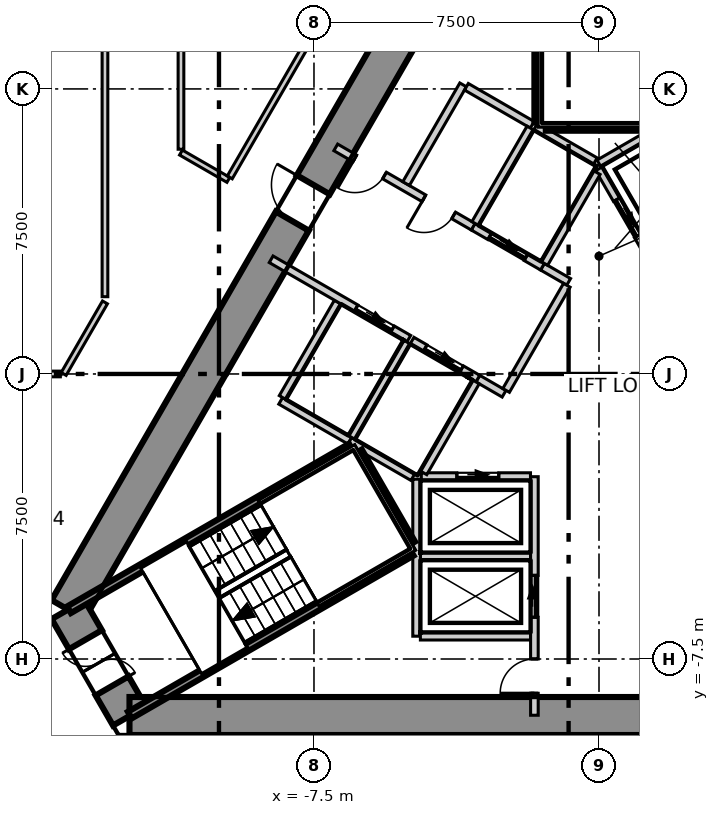
"""IFC4 building model, lengths in metres.
Left out: names, types, materials, properties, quantities, classifications, styles, units other than length and angle.
Written with IfcOpenShell. Run it as: python <this file> out.ifc"""

import sys

from ifc_helpers import new_model, si_unit, direction, frame, frame_2d, origin, place, context, subcontext, project, spatial, polyline, rectangle, outline, extrude, element, fill, save


model = new_model("IFC4")
c1 = context("Model", 3, precision=1e-05, world=origin(), true_north=direction((0.0, 1.0)))
c2 = subcontext(c1, "Body", "Model", "MODEL_VIEW")
j1 = project(units=[si_unit("LENGTHUNIT", "METRE"), si_unit("PLANEANGLEUNIT", "RADIAN")], contexts=[c1])
p1 = place(None, origin())
s1 = spatial("IfcSite", under=j1, at=p1, CompositionType="ELEMENT")
p2 = place(p1, origin())
s2 = spatial("IfcBuilding", under=s1, at=p2, CompositionType="ELEMENT")
p3 = place(p2, frame((0.0, 0.0, 25.3)))
s3 = spatial("IfcBuildingStorey", under=s2, at=p3, CompositionType="ELEMENT", Elevation=25.3)
p4 = place(p3, frame((-1.617, 15.2, -0.4), z_axis=(0.0, 0.0, 1.0), x_axis=(-0.499992141631, -0.866029940768, 0.0)))
e1 = element("IfcWall", 1, at=p4, inside=s3, PredefinedType="SHEAR", context=c2, shape_type="SweptSolid", body=[
    extrude(outline(polyline([(-0.289, -0.499), (1.656, -0.499), (3.601, -0.499), (5.547, -0.499), (7.492, -0.499), (9.437, -0.5), (11.382, -0.5), (13.328, -0.5), (15.273, -0.5), (17.218, -0.5), (19.163, -0.5), (21.109, -0.5), (23.054, -0.5), (24.999, -0.5), (24.422, 0.5), (22.566, 0.5), (20.709, 0.5), (18.853, 0.5), (16.997, 0.5), (15.14, 0.5), (13.284, 0.5), (11.427, 0.5), (9.571, 0.5), (7.715, 0.5), (5.858, 0.5), (4.002, 0.5), (2.146, 0.5), (0.289, 0.5), (-0.289, -0.499)])), origin(), (0.0, 0.0, 1.0), 5.0),
])
p5 = place(p4, frame((11.805, 0.0, 0.4)))
e2 = element("IfcOpeningElement", 2, at=p5, cuts=e1, PredefinedType="OPENING", context=c2, shape_type="SweptSolid", body=[
    extrude(rectangle(XDim=1.1, YDim=2.1, at=frame_2d((0.55, 1.05))), frame((0.0, 0.51, 0.0), z_axis=(0.0, -1.0, 0.0), x_axis=(1.0, 0.0, 0.0)), (0.0, 0.0, 1.0), 1.02),
])
p6 = place(p3, frame((-13.972, -6.2, -0.4), z_axis=(0.0, 0.0, 1.0), x_axis=(0.500077567175, -0.865980615723, 0.0)))
e3 = element("IfcWall", 3, at=p6, inside=s3, PredefinedType="SHEAR", context=c2, shape_type="SweptSolid", body=[
    extrude(outline(polyline([(-0.289, -0.5), (1.616, -0.5), (3.522, -0.5), (2.944, 0.499), (1.617, 0.5), (0.289, 0.5), (-0.289, -0.5)])), origin(), (0.0, 0.0, 1.0), 5.0),
])
p7 = place(p6, frame((0.917, 0.0, 0.4)))
e4 = element("IfcOpeningElement", 4, at=p7, cuts=e3, PredefinedType="OPENING", context=c2, shape_type="SweptSolid", body=[
    extrude(rectangle(XDim=1.4, YDim=2.1, at=frame_2d((0.7, 1.05))), frame((0.0, 0.51, 0.0), z_axis=(0.0, -1.0, 0.0), x_axis=(1.0, 0.0, 0.0)), (0.0, 0.0, 1.0), 1.02),
])
p8 = place(p3, frame((-12.355, -9.0, -0.4), z_axis=(0.0, 0.0, 1.0), x_axis=(1.0, 0.0, 0.0)))
e5 = element("IfcWall", 5, at=p8, inside=s3, PredefinedType="SHEAR", context=c2, shape_type="SweptSolid", body=[
    extrude(outline(polyline([(-0.289, -0.5), (1.656, -0.5), (3.601, -0.5), (5.547, -0.5), (7.492, -0.5), (9.437, -0.5), (11.382, -0.5), (13.328, -0.5), (15.273, -0.5), (17.218, -0.5), (19.163, -0.5), (21.109, -0.5), (23.054, -0.5), (24.999, -0.5), (24.422, 0.5), (22.566, 0.5), (20.709, 0.5), (18.853, 0.5), (16.996, 0.5), (15.14, 0.5), (13.283, 0.5), (11.427, 0.5), (9.57, 0.5), (7.714, 0.5), (5.857, 0.5), (4.001, 0.5), (2.145, 0.5), (0.288, 0.5), (-0.289, -0.5)])), origin(), (0.0, 0.0, 1.0), 5.0),
])
p9 = place(p3, frame((-16.801, -7.7, 0.0), z_axis=(0.0, 0.0, 1.0), x_axis=(0.50000986103, -0.866019710441, 0.0)))
e6 = element("IfcWall", 6, at=p9, inside=s3, PredefinedType="PARTITIONING", context=c2, shape_type="SweptSolid", body=[
    extrude(rectangle(XDim=5.196, YDim=0.15, at=frame_2d((2.598, 0.0))), origin(), (0.0, 0.0, 1.0), 4.6),
])
p10 = place(p3, frame((-11.0, 5.826, 0.0), z_axis=(0.0, 0.0, 1.0), x_axis=(0.866326729571, -0.49947772486, 0.0)))
e7 = element("IfcWall", 7, at=p10, inside=s3, PredefinedType="PARTITIONING", context=c2, shape_type="SweptSolid", body=[
    extrude(rectangle(XDim=1.439, YDim=0.15, at=frame_2d((0.72, 0.0))), origin(), (0.0, 0.0, 1.0), 4.1),
])
p11 = place(p3, frame((-9.716, 5.172, 0.0), z_axis=(0.0, 0.0, 1.0), x_axis=(0.500064951837, 0.865987900576, 0.0)))
e8 = element("IfcWall", 8, at=p11, inside=s3, PredefinedType="PARTITIONING", context=c2, shape_type="SweptSolid", body=[
    extrude(rectangle(XDim=11.765, YDim=0.15, at=frame_2d((5.882, 0.0))), origin(), (0.0, 0.0, 1.0), 4.6),
])
p12 = place(p11, frame((5.382, 0.0, 0.0)))
e9 = element("IfcOpeningElement", 9, at=p12, cuts=e8, PredefinedType="OPENING", context=c2, shape_type="SweptSolid", body=[
    extrude(rectangle(XDim=1.0, YDim=2.1, at=frame_2d((0.5, 1.05))), frame((0.0, 0.085, 0.0), z_axis=(0.0, -1.0, 0.0), x_axis=(1.0, 0.0, 0.0)), (0.0, 0.0, 1.0), 0.17),
])
p13 = place(p3, frame((-11.0, 5.913, 0.0), z_axis=(0.0, 0.0, 1.0), x_axis=(0.0, 1.0, 0.0)))
e10 = element("IfcWall", 10, at=p13, inside=s3, PredefinedType="PARTITIONING", context=c2, shape_type="SweptSolid", body=[
    extrude(rectangle(XDim=5.087, YDim=0.15, at=frame_2d((2.543, 0.0))), origin(), (0.0, 0.0, 1.0), 4.6),
])
p14 = place(p3, frame((-14.087, 0.0, 0.0), z_axis=(0.0, 0.0, 1.0), x_axis=(0.499907138174, 0.866079010947, 0.0)))
e11 = element("IfcWall", 11, at=p14, inside=s3, PredefinedType="PARTITIONING", context=c2, shape_type="SweptSolid", body=[
    extrude(rectangle(XDim=2.174, YDim=0.15, at=frame_2d((1.087, 0.0))), origin(), (0.0, 0.0, 1.0), 4.6),
])
p15 = place(p3, frame((-20.554, 0.0, 0.0), z_axis=(0.0, 0.0, 1.0), x_axis=(1.0, 0.0, 0.0)))
e12 = element("IfcWall", 12, at=p15, inside=s3, PredefinedType="PARTITIONING", context=c2, shape_type="SweptSolid", body=[
    extrude(rectangle(XDim=6.38, YDim=0.15, at=frame_2d((3.19, 0.0))), origin(), (0.0, 0.0, 1.0), 4.6),
])
p16 = place(p3, frame((-13.0, 2.033, 0.0), z_axis=(0.0, 0.0, 1.0), x_axis=(0.0, 1.0, 0.0)))
e13 = element("IfcWall", 13, at=p16, inside=s3, PredefinedType="PARTITIONING", context=c2, shape_type="SweptSolid", body=[
    extrude(rectangle(XDim=6.892, YDim=0.15, at=frame_2d((3.446, 0.0))), origin(), (0.0, 0.0, 1.0), 4.6),
])
p17 = place(p3, frame((-8.376, -0.707, 0.0), z_axis=(0.0, 0.0, 1.0), x_axis=(0.866067520717, -0.499927044236, 0.0)))
e14 = element("IfcWall", 14, at=p17, inside=s3, PredefinedType="SOLIDWALL", context=c2, shape_type="SweptSolid", body=[
    extrude(rectangle(XDim=2.1, YDim=0.2, at=frame_2d((1.05, 0.0))), origin(), (0.0, 0.0, 1.0), 4.6),
])
p18 = place(p3, frame((-8.326, -0.62, 0.0), z_axis=(0.0, 0.0, 1.0), x_axis=(0.500023687443, 0.866011727401, 0.0)))
e15 = element("IfcWall", 15, at=p18, inside=s3, PredefinedType="SOLIDWALL", context=c2, shape_type="SweptSolid", body=[
    extrude(rectangle(XDim=2.9, YDim=0.2, at=frame_2d((1.45, 0.0))), origin(), (0.0, 0.0, 1.0), 4.6),
])
p19 = place(p3, frame((-4.7, -4.8, 0.0), z_axis=(0.0, 0.0, 1.0), x_axis=(1.0, 0.0, 0.0)))
e16 = element("IfcWall", 16, at=p19, inside=s3, PredefinedType="SOLIDWALL", context=c2, shape_type="SweptSolid", body=[
    extrude(rectangle(XDim=2.9, YDim=0.2, at=frame_2d((1.45, 0.0))), origin(), (0.0, 0.0, 1.0), 4.6),
])
p20 = place(p3, frame((-4.8, -6.9, 0.0), z_axis=(0.0, 0.0, 1.0), x_axis=(0.0, 1.0, 0.0)))
e17 = element("IfcWall", 17, at=p20, inside=s3, PredefinedType="SOLIDWALL", context=c2, shape_type="SweptSolid", body=[
    extrude(rectangle(XDim=4.131, YDim=0.2, at=frame_2d((2.065, 0.0))), origin(), (0.0, 0.0, 1.0), 4.6),
])
p21 = place(p3, frame((-4.7, -6.9, 0.0), z_axis=(0.0, 0.0, 1.0), x_axis=(1.0, 0.0, 0.0)))
e18 = element("IfcWall", 18, at=p21, inside=s3, PredefinedType="SOLIDWALL", context=c2, shape_type="SweptSolid", body=[
    extrude(rectangle(XDim=2.9, YDim=0.2, at=frame_2d((1.45, 0.0))), origin(), (0.0, 0.0, 1.0), 4.6),
])
p22 = place(p3, frame((-1.7, -8.98, 0.0), z_axis=(0.0, 0.0, 1.0), x_axis=(0.0, 1.0, 0.0)))
e19 = element("IfcWall", 19, at=p22, inside=s3, PredefinedType="SOLIDWALL", context=c2, shape_type="SweptSolid", body=[
    extrude(rectangle(XDim=6.277, YDim=0.2, at=frame_2d((3.139, 0.0))), origin(), (0.0, 0.0, 1.0), 4.6),
])
p23 = place(p22, frame((2.58, 0.0, 0.0)))
e20 = element("IfcOpeningElement", 20, at=p23, cuts=e19, PredefinedType="OPENING", context=c2, shape_type="SweptSolid", body=[
    extrude(rectangle(XDim=1.1, YDim=2.1, at=frame_2d((0.55, 1.05))), frame((0.0, 0.11, 0.0), z_axis=(0.0, -1.0, 0.0), x_axis=(1.0, 0.0, 0.0)), (0.0, 0.0, 1.0), 0.22),
])
p24 = place(p22, frame((0.58, 0.0, 0.0)))
e21 = element("IfcOpeningElement", 21, at=p24, cuts=e19, PredefinedType="OPENING", context=c2, shape_type="SweptSolid", body=[
    extrude(rectangle(XDim=0.9, YDim=2.1, at=frame_2d((0.45, 1.05))), frame((0.0, 0.11, 0.0), z_axis=(0.0, -1.0, 0.0), x_axis=(1.0, 0.0, 0.0)), (0.0, 0.0, 1.0), 0.22),
])
p25 = place(p3, frame((-4.676, -2.7, 0.0), z_axis=(0.0, 0.0, 1.0), x_axis=(1.0, 0.0, 0.0)))
e22 = element("IfcWall", 22, at=p25, inside=s3, PredefinedType="SOLIDWALL", context=c2, shape_type="SweptSolid", body=[
    extrude(rectangle(XDim=2.873, YDim=0.2, at=frame_2d((1.437, 0.0))), origin(), (0.0, 0.0, 1.0), 4.6),
])
p26 = place(p25, frame((0.937, 0.0, 0.0)))
e23 = element("IfcOpeningElement", 23, at=p26, cuts=e22, PredefinedType="OPENING", context=c2, shape_type="SweptSolid", body=[
    extrude(rectangle(XDim=1.1, YDim=2.1, at=frame_2d((0.55, 1.05))), frame((0.0, 0.11, 0.0), z_axis=(0.0, -1.0, 0.0), x_axis=(1.0, 0.0, 0.0)), (0.0, 0.0, 1.0), 0.22),
])
p27 = place(p3, frame((-0.002, 5.541, 0.0), z_axis=(0.0, 0.0, 1.0), x_axis=(0.86600155993, 0.500041296494, 0.0)))
e24 = element("IfcWall", 24, at=p27, inside=s3, PredefinedType="SOLIDWALL", context=c2, shape_type="SweptSolid", body=[
    extrude(rectangle(XDim=4.132, YDim=0.2, at=frame_2d((2.066, 0.0))), origin(), (0.0, 0.0, 1.0), 4.6),
])
p28 = place(p3, frame((0.0, 5.4, 0.0), z_axis=(0.0, 0.0, 1.0), x_axis=(0.500103862429, -0.865965430478, 0.0)))
e25 = element("IfcWall", 25, at=p28, inside=s3, PredefinedType="SOLIDWALL", context=c2, shape_type="SweptSolid", body=[
    extrude(rectangle(XDim=2.973, YDim=0.2, at=frame_2d((1.487, 0.0))), origin(), (0.0, 0.0, 1.0), 4.6),
])
p29 = place(p28, frame((0.937, 0.0, 0.0)))
e26 = element("IfcOpeningElement", 26, at=p29, cuts=e25, PredefinedType="OPENING", context=c2, shape_type="SweptSolid", body=[
    extrude(rectangle(XDim=1.1, YDim=2.1, at=frame_2d((0.55, 1.05))), frame((0.0, 0.11, 0.0), z_axis=(0.0, -1.0, 0.0), x_axis=(1.0, 0.0, 0.0)), (0.0, 0.0, 1.0), 0.22),
])
p30 = place(p3, frame((-8.627, 3.018, 0.0), z_axis=(0.0, 0.0, 1.0), x_axis=(0.866039775641, -0.499975106388, 0.0)))
e27 = element("IfcWall", 27, at=p30, inside=s3, PredefinedType="SOLIDWALL", context=c2, shape_type="SweptSolid", body=[
    extrude(rectangle(XDim=4.182, YDim=0.2, at=frame_2d((2.091, 0.0))), origin(), (0.0, 0.0, 1.0), 4.6),
])
p31 = place(p30, frame((2.58, 0.0, 0.0)))
e28 = element("IfcOpeningElement", 28, at=p31, cuts=e27, PredefinedType="OPENING", context=c2, shape_type="SweptSolid", body=[
    extrude(rectangle(XDim=1.1, YDim=2.1, at=frame_2d((0.55, 1.05))), frame((0.0, 0.11, 0.0), z_axis=(0.0, -1.0, 0.0), x_axis=(1.0, 0.0, 0.0)), (0.0, 0.0, 1.0), 0.22),
])
p32 = place(p3, frame((-3.188, -0.122, 0.0), z_axis=(0.0, 0.0, 1.0), x_axis=(0.865705793592, -0.50055317294, 0.0)))
e29 = element("IfcWall", 29, at=p32, inside=s3, PredefinedType="SOLIDWALL", context=c2, shape_type="SweptSolid", body=[
    extrude(rectangle(XDim=0.797, YDim=0.2, at=frame_2d((0.398, 0.0))), origin(), (0.0, 0.0, 1.0), 4.6),
])
p33 = place(p3, frame((-6.927, 5.962, 0.0), z_axis=(0.0, 0.0, 1.0), x_axis=(0.866065051207, -0.49993132236, 0.0)))
e30 = element("IfcWall", 30, at=p33, inside=s3, PredefinedType="SOLIDWALL", context=c2, shape_type="SweptSolid", body=[
    extrude(rectangle(XDim=4.182, YDim=0.2, at=frame_2d((2.091, 0.0))), origin(), (0.0, 0.0, 1.0), 4.6),
])
p34 = place(p33, frame((2.68, 0.0, 0.0)))
e31 = element("IfcOpeningElement", 31, at=p34, cuts=e30, PredefinedType="OPENING", context=c2, shape_type="SweptSolid", body=[
    extrude(rectangle(XDim=0.9, YDim=2.1, at=frame_2d((0.45, 1.05))), frame((0.0, 0.11, 0.0), z_axis=(0.0, -1.0, 0.0), x_axis=(1.0, 0.0, 0.0)), (0.0, 0.0, 1.0), 0.22),
])
p35 = place(p33, frame((0.58, 0.0, 0.0)))
e32 = element("IfcOpeningElement", 32, at=p35, cuts=e30, PredefinedType="OPENING", context=c2, shape_type="SweptSolid", body=[
    extrude(rectangle(XDim=0.9, YDim=2.1, at=frame_2d((0.45, 1.05))), frame((0.0, 0.11, 0.0), z_axis=(0.0, -1.0, 0.0), x_axis=(1.0, 0.0, 0.0)), (0.0, 0.0, 1.0), 0.22),
])
p36 = place(p3, frame((-1.488, 2.822, 0.0), z_axis=(0.0, 0.0, 1.0), x_axis=(0.866236612152, -0.499633997809, 0.0)))
e33 = element("IfcWall", 33, at=p36, inside=s3, PredefinedType="SOLIDWALL", context=c2, shape_type="SweptSolid", body=[
    extrude(rectangle(XDim=0.796, YDim=0.2, at=frame_2d((0.398, 0.0))), origin(), (0.0, 0.0, 1.0), 4.6),
])
p37 = place(p3, frame((-5.076, 5.009, 0.0), z_axis=(0.0, 0.0, 1.0), x_axis=(0.50002537861, 0.866010750942, 0.0)))
e34 = element("IfcWall", 34, at=p37, inside=s3, PredefinedType="SOLIDWALL", context=c2, shape_type="SweptSolid", body=[
    extrude(rectangle(XDim=3.0, YDim=0.2, at=frame_2d((1.5, 0.0))), origin(), (0.0, 0.0, 1.0), 4.6),
])
p38 = place(p3, frame((-3.489, 7.557, 0.0), z_axis=(0.0, 0.0, 1.0), x_axis=(0.866010750942, -0.50002537861, 0.0)))
e35 = element("IfcWall", 35, at=p38, inside=s3, PredefinedType="SOLIDWALL", context=c2, shape_type="SweptSolid", body=[
    extrude(rectangle(XDim=2.0, YDim=0.2, at=frame_2d((1.0, 0.0))), origin(), (0.0, 0.0, 1.0), 4.6),
])
p39 = place(p3, frame((-2.444, -0.433, 0.0), z_axis=(0.0, 0.0, 1.0), x_axis=(0.500035624827, 0.866004834804, 0.0)))
e36 = element("IfcWall", 36, at=p39, inside=s3, PredefinedType="SOLIDWALL", context=c2, shape_type="SweptSolid", body=[
    extrude(rectangle(XDim=3.194, YDim=0.2, at=frame_2d((1.597, 0.0))), origin(), (0.0, 0.0, 1.0), 4.6),
])
p40 = place(p3, frame((-6.557, -1.757, 0.0), z_axis=(0.0, 0.0, 1.0), x_axis=(0.8659754619, -0.500086491905, 0.0)))
e37 = element("IfcWall", 37, at=p40, inside=s3, PredefinedType="SOLIDWALL", context=c2, shape_type="SweptSolid", body=[
    extrude(rectangle(XDim=1.916, YDim=0.2, at=frame_2d((0.958, 0.0))), origin(), (0.0, 0.0, 1.0), 4.6),
])
p41 = place(p3, frame((-6.507, -1.67, 0.0), z_axis=(0.0, 0.0, 1.0), x_axis=(0.50012328804, 0.865954211699, 0.0)))
e38 = element("IfcWall", 38, at=p41, inside=s3, PredefinedType="SOLIDWALL", context=c2, shape_type="SweptSolid", body=[
    extrude(rectangle(XDim=2.9, YDim=0.2, at=frame_2d((1.45, 0.0))), origin(), (0.0, 0.0, 1.0), 4.6),
])
p42 = place(p3, frame((-4.92, 0.878, 0.0), z_axis=(0.0, 0.0, 1.0), x_axis=(0.866010750942, -0.50002537861, 0.0)))
e39 = element("IfcWall", 39, at=p42, inside=s3, PredefinedType="SOLIDWALL", context=c2, shape_type="SweptSolid", body=[
    extrude(rectangle(XDim=2.0, YDim=0.2, at=frame_2d((1.0, 0.0))), origin(), (0.0, 0.0, 1.0), 4.6),
])
p43 = place(p42, frame((0.4, 0.0, 0.0)))
e40 = element("IfcOpeningElement", 40, at=p43, cuts=e39, PredefinedType="OPENING", context=c2, shape_type="SweptSolid", body=[
    extrude(rectangle(XDim=1.1, YDim=2.1, at=frame_2d((0.55, 1.05))), frame((0.0, 0.11, 0.0), z_axis=(0.0, -1.0, 0.0), x_axis=(1.0, 0.0, 0.0)), (0.0, 0.0, 1.0), 0.22),
])
p44 = place(p3, frame((-4.619, -2.6, 0.0), z_axis=(0.0, 0.0, 1.0), x_axis=(0.50009492287, 0.865970593103, 0.0)))
e41 = element("IfcWall", 41, at=p44, inside=s3, PredefinedType="SOLIDWALL", context=c2, shape_type="SweptSolid", body=[
    extrude(rectangle(XDim=2.761, YDim=0.2, at=frame_2d((1.381, 0.0))), origin(), (0.0, 0.0, 1.0), 4.6),
])
p45 = place(p3, frame((-3.309, 3.873, 0.0), z_axis=(0.0, 0.0, 1.0), x_axis=(0.866098583652, -0.499873227325, 0.0)))
e42 = element("IfcWall", 42, at=p45, inside=s3, PredefinedType="SOLIDWALL", context=c2, shape_type="SweptSolid", body=[
    extrude(rectangle(XDim=2.103, YDim=0.2, at=frame_2d((1.051, 0.0))), origin(), (0.0, 0.0, 1.0), 4.6),
])
p46 = place(p45, frame((0.502, 0.0, 0.0)))
e43 = element("IfcOpeningElement", 43, at=p46, cuts=e42, PredefinedType="OPENING", context=c2, shape_type="SweptSolid", body=[
    extrude(rectangle(XDim=1.1, YDim=2.1, at=frame_2d((0.55, 1.05))), frame((0.0, 0.11, 0.0), z_axis=(0.0, -1.0, 0.0), x_axis=(1.0, 0.0, 0.0)), (0.0, 0.0, 1.0), 0.22),
])
p47 = place(p3, frame((-3.257, 3.959, 0.0), z_axis=(0.0, 0.0, 1.0), x_axis=(0.50012328804, 0.865954211699, 0.0)))
e44 = element("IfcWall", 44, at=p47, inside=s3, PredefinedType="SOLIDWALL", context=c2, shape_type="SweptSolid", body=[
    extrude(rectangle(XDim=2.9, YDim=0.2, at=frame_2d((1.45, 0.0))), origin(), (0.0, 0.0, 1.0), 4.6),
])
p48 = place(p3, frame((-1.67, 6.507, 0.0), z_axis=(0.0, 0.0, 1.0), x_axis=(0.865941441609, -0.500145398563, 0.0)))
e45 = element("IfcWall", 45, at=p48, inside=s3, PredefinedType="SOLIDWALL", context=c2, shape_type="SweptSolid", body=[
    extrude(rectangle(XDim=1.815, YDim=0.2, at=frame_2d((0.908, 0.0))), origin(), (0.0, 0.0, 1.0), 4.6),
])
p49 = place(p3, frame((-1.438, 2.909, 0.0), z_axis=(0.0, 0.0, 1.0), x_axis=(0.499829630636, 0.866123744241, 0.0)))
e46 = element("IfcWall", 46, at=p49, inside=s3, PredefinedType="SOLIDWALL", context=c2, shape_type="SweptSolid", body=[
    extrude(rectangle(XDim=2.761, YDim=0.2, at=frame_2d((1.38, 0.0))), origin(), (0.0, 0.0, 1.0), 4.6),
])
p50 = place(p3, frame((-13.946, -6.204, 0.0), z_axis=(0.0, 0.0, 1.0), x_axis=(0.866036527536, 0.499980732602, 0.0)))
e47 = element("IfcWall", 47, at=p50, inside=s3, PredefinedType="SOLIDWALL", context=c2, shape_type="SweptSolid", body=[
    extrude(rectangle(XDim=8.564, YDim=0.2, at=frame_2d((4.282, 0.0))), origin(), (0.0, 0.0, 1.0), 4.6),
])
p51 = place(p3, frame((-6.329, -2.038, 0.0), z_axis=(0.0, 0.0, 1.0), x_axis=(0.500200581029, -0.865909567298, 0.0)))
e48 = element("IfcWall", 48, at=p51, inside=s3, PredefinedType="SOLIDWALL", context=c2, shape_type="SweptSolid", body=[
    extrude(rectangle(XDim=2.799, YDim=0.2, at=frame_2d((1.399, 0.0))), origin(), (0.0, 0.0, 1.0), 4.6),
])
p52 = place(p3, frame((-12.346, -8.976, 0.0), z_axis=(0.0, 0.0, 1.0), x_axis=(0.865987152174, 0.50006624788, 0.0)))
e49 = element("IfcWall", 49, at=p52, inside=s3, PredefinedType="SOLIDWALL", context=c2, shape_type="SweptSolid", body=[
    extrude(rectangle(XDim=8.565, YDim=0.2, at=frame_2d((4.282, 0.0))), origin(), (0.0, 0.0, 1.0), 4.6),
])
p53 = place(p3, frame((-1.4, 6.5, 0.0), z_axis=(0.0, 0.0, 1.0), x_axis=(1.0, 0.0, 0.0)))
e50 = element("IfcWall", 50, at=p53, inside=s3, PredefinedType="SOLIDWALL", context=c2, shape_type="SweptSolid", body=[
    extrude(rectangle(XDim=2.8, YDim=0.2, at=frame_2d((1.4, 0.0))), origin(), (0.0, 0.0, 1.0), 4.6),
])
p54 = place(p3, frame((-1.6, 6.615, 0.0), z_axis=(0.0, 0.0, 1.0), x_axis=(0.0, 1.0, 0.0)))
e51 = element("IfcWall", 51, at=p54, inside=s3, PredefinedType="SOLIDWALL", context=c2, shape_type="SweptSolid", body=[
    extrude(rectangle(XDim=8.565, YDim=0.2, at=frame_2d((4.282, 0.0))), origin(), (0.0, 0.0, 1.0), 4.6),
])
p55 = place(p26, origin())
e52 = element("IfcDoor", 52, at=p55, inside=s3, OperationType="SLIDING_TO_LEFT", PredefinedType="DOOR", context=c2, shape_type="SweptSolid", body=[
    extrude(rectangle(XDim=1.1, YDim=2.1, at=frame_2d((0.55, 1.05))), frame((0.0, 0.025, 0.0), z_axis=(0.0, -1.0, 0.0), x_axis=(1.0, 0.0, 0.0)), (0.0, 0.0, 1.0), 0.05),
])
fill(e23, e52)
p56 = place(p23, origin())
e53 = element("IfcDoor", 53, at=p56, inside=s3, OperationType="SLIDING_TO_LEFT", PredefinedType="DOOR", context=c2, shape_type="SweptSolid", body=[
    extrude(rectangle(XDim=1.1, YDim=2.1, at=frame_2d((0.55, 1.05))), frame((0.0, 0.025, 0.0), z_axis=(0.0, -1.0, 0.0), x_axis=(1.0, 0.0, 0.0)), (0.0, 0.0, 1.0), 0.05),
])
fill(e20, e53)
p57 = place(p29, origin())
e54 = element("IfcDoor", 54, at=p57, inside=s3, OperationType="SLIDING_TO_LEFT", PredefinedType="DOOR", context=c2, shape_type="SweptSolid", body=[
    extrude(rectangle(XDim=1.1, YDim=2.1, at=frame_2d((0.55, 1.05))), frame((0.0, 0.025, 0.0), z_axis=(0.0, -1.0, 0.0), x_axis=(1.0, 0.0, 0.0)), (0.0, 0.0, 1.0), 0.05),
])
fill(e26, e54)
p58 = place(p43, origin())
e55 = element("IfcDoor", 55, at=p58, inside=s3, OperationType="SLIDING_TO_LEFT", PredefinedType="DOOR", context=c2, shape_type="SweptSolid", body=[
    extrude(rectangle(XDim=1.1, YDim=2.1, at=frame_2d((0.55, 1.05))), frame((0.0, 0.025, 0.0), z_axis=(0.0, -1.0, 0.0), x_axis=(1.0, 0.0, 0.0)), (0.0, 0.0, 1.0), 0.05),
])
fill(e40, e55)
p59 = place(p46, origin())
e56 = element("IfcDoor", 56, at=p59, inside=s3, OperationType="SLIDING_TO_LEFT", PredefinedType="DOOR", context=c2, shape_type="SweptSolid", body=[
    extrude(rectangle(XDim=1.1, YDim=2.1, at=frame_2d((0.55, 1.05))), frame((0.0, 0.025, 0.0), z_axis=(0.0, -1.0, 0.0), x_axis=(1.0, 0.0, 0.0)), (0.0, 0.0, 1.0), 0.05),
])
fill(e43, e56)
p60 = place(p31, origin())
e57 = element("IfcDoor", 57, at=p60, inside=s3, OperationType="SLIDING_TO_LEFT", PredefinedType="DOOR", context=c2, shape_type="SweptSolid", body=[
    extrude(rectangle(XDim=1.1, YDim=2.1, at=frame_2d((0.55, 1.05))), frame((0.0, 0.025, 0.0), z_axis=(0.0, -1.0, 0.0), x_axis=(1.0, 0.0, 0.0)), (0.0, 0.0, 1.0), 0.05),
])
fill(e28, e57)
p61 = place(p34, origin())
e58 = element("IfcDoor", 58, at=p61, inside=s3, OperationType="SINGLE_SWING_LEFT", PredefinedType="DOOR", context=c2, shape_type="SweptSolid", body=[
    extrude(rectangle(XDim=0.9, YDim=2.1, at=frame_2d((0.45, 1.05))), frame((0.0, 0.025, 0.0), z_axis=(0.0, -1.0, 0.0), x_axis=(1.0, 0.0, 0.0)), (0.0, 0.0, 1.0), 0.05),
])
fill(e31, e58)
p62 = place(p7, origin())
e59 = element("IfcDoor", 59, at=p62, inside=s3, OperationType="DOUBLE_DOOR_SINGLE_SWING", PredefinedType="DOOR", context=c2, shape_type="SweptSolid", body=[
    extrude(rectangle(XDim=1.4, YDim=2.1, at=frame_2d((0.7, 1.05))), frame((0.0, 0.025, 0.0), z_axis=(0.0, -1.0, 0.0), x_axis=(1.0, 0.0, 0.0)), (0.0, 0.0, 1.0), 0.05),
])
fill(e4, e59)
p63 = place(p5, origin())
e60 = element("IfcDoor", 60, at=p63, inside=s3, OperationType="SINGLE_SWING_LEFT", PredefinedType="DOOR", context=c2, shape_type="SweptSolid", body=[
    extrude(rectangle(XDim=1.1, YDim=2.1, at=frame_2d((0.55, 1.05))), frame((0.0, 0.025, 0.0), z_axis=(0.0, -1.0, 0.0), x_axis=(1.0, 0.0, 0.0)), (0.0, 0.0, 1.0), 0.05),
])
fill(e2, e60)
p64 = place(p24, origin())
e61 = element("IfcDoor", 61, at=p64, inside=s3, OperationType="SINGLE_SWING_RIGHT", PredefinedType="DOOR", context=c2, shape_type="SweptSolid", body=[
    extrude(rectangle(XDim=0.9, YDim=2.1, at=frame_2d((0.45, 1.05))), frame((0.0, 0.025, 0.0), z_axis=(0.0, -1.0, 0.0), x_axis=(1.0, 0.0, 0.0)), (0.0, 0.0, 1.0), 0.05),
])
fill(e21, e61)
p65 = place(p35, origin())
e62 = element("IfcDoor", 62, at=p65, inside=s3, OperationType="SINGLE_SWING_LEFT", PredefinedType="DOOR", context=c2, shape_type="SweptSolid", body=[
    extrude(rectangle(XDim=0.9, YDim=2.1, at=frame_2d((0.45, 1.05))), frame((0.0, 0.025, 0.0), z_axis=(0.0, -1.0, 0.0), x_axis=(1.0, 0.0, 0.0)), (0.0, 0.0, 1.0), 0.05),
])
fill(e32, e62)
save(model, sys.argv[1])
